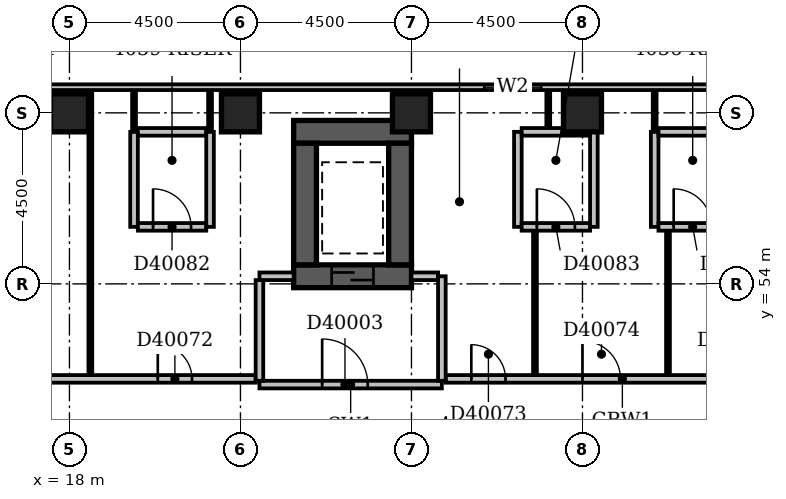
"""IFC4 building model, lengths in metres.
Left out: names, types, materials, properties, quantities, classifications, styles, units other than length and angle.
Written with IfcOpenShell. Run it as: python <this file> out.ifc"""

import sys

from ifc_helpers import new_model, si_unit, direction, frame, frame_2d, origin, origin_2d, place, context, subcontext, project, spatial, rectangle, extrude, element, fill, save


model = new_model("IFC4")
c1 = context("Model", 3, precision=1e-05, world=origin(), true_north=direction((0.0, 1.0)))
c2 = subcontext(c1, "Body", "Model", "MODEL_VIEW")
j1 = project(units=[si_unit("LENGTHUNIT", "METRE"), si_unit("PLANEANGLEUNIT", "RADIAN")], contexts=[c1])
p1 = place(None, origin())
s1 = spatial("IfcSite", under=j1, at=p1, CompositionType="ELEMENT")
p2 = place(p1, origin())
s2 = spatial("IfcBuilding", under=s1, at=p2, CompositionType="ELEMENT")
p3 = place(p2, frame((0.0, 0.0, 159.2)))
s3 = spatial("IfcBuildingStorey", under=s2, at=p3, CompositionType="ELEMENT", Elevation=159.2)
p4 = place(p3, frame((23.9, 54.2, -0.3), z_axis=(0.0, 0.0, 1.0), x_axis=(1.0, 0.0, 0.0)))
e1 = element("IfcWall", 1, at=p4, inside=s3, PredefinedType="SHEAR", context=c2, shape_type="SweptSolid", body=[
    extrude(rectangle(XDim=3.1, YDim=0.6, at=frame_2d((1.55, 0.0))), origin(), (0.0, 0.0, 1.0), 3.6),
])
p5 = place(p4, frame((1.0, 0.0, 0.3)))
e2 = element("IfcOpeningElement", 2, at=p5, cuts=e1, PredefinedType="OPENING", context=c2, shape_type="SweptSolid", body=[
    extrude(rectangle(XDim=1.1, YDim=2.1, at=frame_2d((0.55, 1.05))), frame((0.0, 0.312, 0.0), z_axis=(0.0, -1.0, 0.0), x_axis=(1.0, 0.0, 0.0)), (0.0, 0.0, 1.0), 0.624),
])
p6 = place(p3, frame((23.9, 58.0, -0.3), z_axis=(0.0, 0.0, 1.0), x_axis=(1.0, 0.0, 0.0)))
e3 = element("IfcWall", 3, at=p6, inside=s3, PredefinedType="SHEAR", context=c2, shape_type="SweptSolid", body=[
    extrude(rectangle(XDim=3.1, YDim=0.6, at=frame_2d((1.55, 0.0))), origin(), (0.0, 0.0, 1.0), 3.6),
])
for number, where, z_axis, x_axis in (
    (4, (24.2, 54.5, -0.3), (0.0, 0.0, 1.0), (0.0, 1.0, 0.0)),
    (5, (26.7, 54.5, -0.3), (0.0, 0.0, 1.0), (0.0, 1.0, 0.0)),
):
    element("IfcWall", number, at=place(p3, frame(where, z_axis=z_axis, x_axis=x_axis)), inside=s3, PredefinedType="SHEAR", context=c2, shape_type="SweptSolid", body=[
        extrude(rectangle(XDim=3.2, YDim=0.6, at=frame_2d((1.6, 0.0))), origin(), (0.0, 0.0, 1.0), 3.6),
    ])
for number, where, z_axis, x_axis in (
    (6, (18.0, 58.5, -0.3), (0.0, 0.0, 1.0), (1.0, 0.0, 0.0)),
    (7, (22.5, 58.5, -0.3), (0.0, 0.0, 1.0), (1.0, 0.0, 0.0)),
    (8, (27.0, 58.5, -0.3), (0.0, 0.0, 1.0), (1.0, 0.0, 0.0)),
    (9, (31.5, 58.5, -0.3), (0.0, 0.0, 1.0), (1.0, 0.0, 0.0)),
):
    element("IfcColumn", number, at=place(p3, frame(where, z_axis=z_axis, x_axis=x_axis)), inside=s3, PredefinedType="COLUMN", context=c2, shape_type="SweptSolid", body=[
        extrude(rectangle(XDim=1.0, YDim=1.0, at=origin_2d()), origin(), (0.0, 0.0, 1.0), 3.6),
    ])
p7 = place(p3, frame((68.1, 59.175, 0.0), z_axis=(0.0, 0.0, 1.0), x_axis=(-1.0, 0.0, 0.0)))
e10 = element("IfcWall", 10, at=p7, inside=s3, PredefinedType="STANDARD", context=c2, shape_type="SweptSolid", body=[
    extrude(rectangle(XDim=68.85, YDim=0.15, at=frame_2d((34.425, 0.0))), origin(), (0.0, 0.0, 1.0), 2.7),
])
p8 = place(p7, frame((1.65, 0.0, 0.6)))
e11 = element("IfcOpeningElement", 11, at=p8, cuts=e10, PredefinedType="OPENING", context=c2, shape_type="SweptSolid", body=[
    extrude(rectangle(XDim=2.4, YDim=1.8, at=frame_2d((1.2, 0.9))), frame((0.0, 0.087, 0.0), z_axis=(0.0, -1.0, 0.0), x_axis=(1.0, 0.0, 0.0)), (0.0, 0.0, 1.0), 0.174),
])
p9 = place(p7, frame((6.15, 0.0, 0.6)))
e12 = element("IfcOpeningElement", 12, at=p9, cuts=e10, PredefinedType="OPENING", context=c2, shape_type="SweptSolid", body=[
    extrude(rectangle(XDim=2.4, YDim=1.8, at=frame_2d((1.2, 0.9))), frame((0.0, 0.087, 0.0), z_axis=(0.0, -1.0, 0.0), x_axis=(1.0, 0.0, 0.0)), (0.0, 0.0, 1.0), 0.174),
])
p10 = place(p7, frame((37.685, 0.0, 0.6)))
e13 = element("IfcOpeningElement", 13, at=p10, cuts=e10, PredefinedType="OPENING", context=c2, shape_type="SweptSolid", body=[
    extrude(rectangle(XDim=1.5, YDim=1.8, at=frame_2d((0.75, 0.9))), frame((0.0, 0.087, 0.0), z_axis=(0.0, -1.0, 0.0), x_axis=(1.0, 0.0, 0.0)), (0.0, 0.0, 1.0), 0.174),
])
p11 = place(p3, frame((23.0, 51.35, 0.0), z_axis=(0.0, 0.0, 1.0), x_axis=(1.0, 0.0, 0.0)))
e14 = element("IfcWall", 14, at=p11, inside=s3, PredefinedType="PARTITIONING", context=c2, shape_type="SweptSolid", body=[
    extrude(rectangle(XDim=4.8, YDim=0.2, at=frame_2d((2.4, 0.0))), origin(), (0.0, 0.0, 1.0), 3.3),
])
p12 = place(p11, frame((1.65, 0.0, 0.0)))
e15 = element("IfcOpeningElement", 15, at=p12, cuts=e14, PredefinedType="OPENING", context=c2, shape_type="SweptSolid", body=[
    extrude(rectangle(XDim=1.2, YDim=2.1, at=frame_2d((0.6, 1.05))), frame((0.0, 0.112, 0.0), z_axis=(0.0, -1.0, 0.0), x_axis=(1.0, 0.0, 0.0)), (0.0, 0.0, 1.0), 0.224),
])
p13 = place(p3, frame((27.8, 51.45, 0.0), z_axis=(0.0, 0.0, 1.0), x_axis=(0.0, 1.0, 0.0)))
e16 = element("IfcWall", 16, at=p13, inside=s3, PredefinedType="PARTITIONING", context=c2, shape_type="SweptSolid", body=[
    extrude(rectangle(XDim=2.75, YDim=0.2, at=frame_2d((1.375, 0.0))), origin(), (0.0, 0.0, 1.0), 3.3),
])
p14 = place(p3, frame((23.0, 54.2, 0.0), z_axis=(0.0, 0.0, 1.0), x_axis=(1.0, 0.0, 0.0)))
e17 = element("IfcWall", 17, at=p14, inside=s3, PredefinedType="PARTITIONING", context=c2, shape_type="SweptSolid", body=[
    extrude(rectangle(XDim=0.9, YDim=0.2, at=frame_2d((0.45, 0.0))), origin(), (0.0, 0.0, 1.0), 3.3),
])
p15 = place(p3, frame((27.0, 54.2, 0.0), z_axis=(0.0, 0.0, 1.0), x_axis=(1.0, 0.0, 0.0)))
e18 = element("IfcWall", 18, at=p15, inside=s3, PredefinedType="PARTITIONING", context=c2, shape_type="SweptSolid", body=[
    extrude(rectangle(XDim=0.7, YDim=0.2, at=frame_2d((0.35, 0.0))), origin(), (0.0, 0.0, 1.0), 3.3),
])
p16 = place(p3, frame((23.0, 51.45, 0.0), z_axis=(0.0, 0.0, 1.0), x_axis=(0.0, 1.0, 0.0)))
e19 = element("IfcWall", 19, at=p16, inside=s3, PredefinedType="PARTITIONING", context=c2, shape_type="SweptSolid", body=[
    extrude(rectangle(XDim=2.65, YDim=0.2, at=frame_2d((1.325, 0.0))), origin(), (0.0, 0.0, 1.0), 3.3),
])
p17 = place(p3, frame((7.6, 51.5, 0.0), z_axis=(0.0, 0.0, 1.0), x_axis=(1.0, 0.0, 0.0)))
e20 = element("IfcWall", 20, at=p17, inside=s3, PredefinedType="PARTITIONING", context=c2, shape_type="SweptSolid", body=[
    extrude(rectangle(XDim=15.3, YDim=0.2, at=frame_2d((7.65, 0.0))), origin(), (0.0, 0.0, 1.0), 3.3),
])
p18 = place(p17, frame((2.075, 0.0, 0.0)))
e21 = element("IfcOpeningElement", 21, at=p18, cuts=e20, PredefinedType="OPENING", context=c2, shape_type="SweptSolid", body=[
    extrude(rectangle(XDim=1.0, YDim=2.1, at=frame_2d((0.5, 1.05))), frame((0.0, 0.112, 0.0), z_axis=(0.0, -1.0, 0.0), x_axis=(1.0, 0.0, 0.0)), (0.0, 0.0, 1.0), 0.224),
])
p19 = place(p17, frame((7.6, 0.0, 0.0)))
e22 = element("IfcOpeningElement", 22, at=p19, cuts=e20, PredefinedType="OPENING", context=c2, shape_type="SweptSolid", body=[
    extrude(rectangle(XDim=1.0, YDim=2.1, at=frame_2d((0.5, 1.05))), frame((0.0, 0.112, 0.0), z_axis=(0.0, -1.0, 0.0), x_axis=(1.0, 0.0, 0.0)), (0.0, 0.0, 1.0), 0.224),
])
p20 = place(p17, frame((12.725, 0.0, 0.0)))
e23 = element("IfcOpeningElement", 23, at=p20, cuts=e20, PredefinedType="OPENING", context=c2, shape_type="SweptSolid", body=[
    extrude(rectangle(XDim=0.9, YDim=2.1, at=frame_2d((0.45, 1.05))), frame((0.0, 0.112, 0.0), z_axis=(0.0, -1.0, 0.0), x_axis=(1.0, 0.0, 0.0)), (0.0, 0.0, 1.0), 0.224),
])
p21 = place(p3, frame((27.9, 51.5, 0.0), z_axis=(0.0, 0.0, 1.0), x_axis=(1.0, 0.0, 0.0)))
e24 = element("IfcWall", 24, at=p21, inside=s3, PredefinedType="PARTITIONING", context=c2, shape_type="SweptSolid", body=[
    extrude(rectangle(XDim=9.3, YDim=0.2, at=frame_2d((4.65, 0.0))), origin(), (0.0, 0.0, 1.0), 3.3),
])
p22 = place(p21, frame((0.675, 0.0, 0.0)))
e25 = element("IfcOpeningElement", 25, at=p22, cuts=e24, PredefinedType="OPENING", context=c2, shape_type="SweptSolid", body=[
    extrude(rectangle(XDim=0.9, YDim=2.1, at=frame_2d((0.45, 1.05))), frame((0.0, 0.112, 0.0), z_axis=(0.0, -1.0, 0.0), x_axis=(1.0, 0.0, 0.0)), (0.0, 0.0, 1.0), 0.224),
])
p23 = place(p21, frame((3.6, 0.0, 0.0)))
e26 = element("IfcOpeningElement", 26, at=p23, cuts=e24, PredefinedType="OPENING", context=c2, shape_type="SweptSolid", body=[
    extrude(rectangle(XDim=1.0, YDim=2.1, at=frame_2d((0.5, 1.05))), frame((0.0, 0.112, 0.0), z_axis=(0.0, -1.0, 0.0), x_axis=(1.0, 0.0, 0.0)), (0.0, 0.0, 1.0), 0.224),
])
p24 = place(p21, frame((7.125, 0.0, 0.0)))
e27 = element("IfcOpeningElement", 27, at=p24, cuts=e24, PredefinedType="OPENING", context=c2, shape_type="SweptSolid", body=[
    extrude(rectangle(XDim=1.0, YDim=2.1, at=frame_2d((0.5, 1.05))), frame((0.0, 0.112, 0.0), z_axis=(0.0, -1.0, 0.0), x_axis=(1.0, 0.0, 0.0)), (0.0, 0.0, 1.0), 0.224),
])
p25 = place(p3, frame((18.55, 51.6, 0.0), z_axis=(0.0, 0.0, 1.0), x_axis=(0.0, 1.0, 0.0)))
e28 = element("IfcWall", 28, at=p25, inside=s3, PredefinedType="PARTITIONING", context=c2, shape_type="SweptSolid", body=[
    extrude(rectangle(XDim=7.5, YDim=0.1, at=frame_2d((3.75, 0.0))), origin(), (0.0, 0.0, 1.0), 3.3),
])
for number, where, z_axis, x_axis in (
    (29, (30.25, 51.6, 0.0), (0.0, 0.0, 1.0), (0.0, 1.0, 0.0)),
    (30, (33.75, 51.6, 0.0), (0.0, 0.0, 1.0), (0.0, 1.0, 0.0)),
):
    element("IfcWall", number, at=place(p3, frame(where, z_axis=z_axis, x_axis=x_axis)), inside=s3, PredefinedType="PARTITIONING", context=c2, shape_type="SweptSolid", body=[
        extrude(rectangle(XDim=3.8, YDim=0.1, at=frame_2d((1.9, 0.0))), origin(), (0.0, 0.0, 1.0), 3.3),
    ])
p26 = place(p3, frame((19.7, 55.5, 0.0), z_axis=(0.0, 0.0, 1.0), x_axis=(0.0, 1.0, 0.0)))
e31 = element("IfcWall", 31, at=p26, inside=s3, PredefinedType="PARTITIONING", context=c2, shape_type="SweptSolid", body=[
    extrude(rectangle(XDim=2.5, YDim=0.2, at=frame_2d((1.25, 0.0))), origin(), (0.0, 0.0, 1.0), 3.3),
])
p27 = place(p3, frame((19.8, 55.5, 0.0), z_axis=(0.0, 0.0, 1.0), x_axis=(1.0, 0.0, 0.0)))
e32 = element("IfcWall", 32, at=p27, inside=s3, PredefinedType="PARTITIONING", context=c2, shape_type="SweptSolid", body=[
    extrude(rectangle(XDim=1.8, YDim=0.2, at=frame_2d((0.9, 0.0))), origin(), (0.0, 0.0, 1.0), 3.3),
])
p28 = place(p27, frame((0.4, 0.0, 0.0)))
e33 = element("IfcOpeningElement", 33, at=p28, cuts=e32, PredefinedType="OPENING", context=c2, shape_type="SweptSolid", body=[
    extrude(rectangle(XDim=1.0, YDim=2.1, at=frame_2d((0.5, 1.05))), frame((0.0, 0.112, 0.0), z_axis=(0.0, -1.0, 0.0), x_axis=(1.0, 0.0, 0.0)), (0.0, 0.0, 1.0), 0.224),
])
for number, where, z_axis, x_axis in (
    (34, (21.7, 55.5, 0.0), (0.0, 0.0, 1.0), (0.0, 1.0, 0.0)),
    (35, (29.8, 55.5, 0.0), (0.0, 0.0, 1.0), (0.0, 1.0, 0.0)),
):
    element("IfcWall", number, at=place(p3, frame(where, z_axis=z_axis, x_axis=x_axis)), inside=s3, PredefinedType="PARTITIONING", context=c2, shape_type="SweptSolid", body=[
        extrude(rectangle(XDim=2.5, YDim=0.2, at=frame_2d((1.25, 0.0))), origin(), (0.0, 0.0, 1.0), 3.3),
    ])
p29 = place(p3, frame((29.9, 55.5, 0.0), z_axis=(0.0, 0.0, 1.0), x_axis=(1.0, 0.0, 0.0)))
e36 = element("IfcWall", 36, at=p29, inside=s3, PredefinedType="PARTITIONING", context=c2, shape_type="SweptSolid", body=[
    extrude(rectangle(XDim=1.8, YDim=0.2, at=frame_2d((0.9, 0.0))), origin(), (0.0, 0.0, 1.0), 3.3),
])
p30 = place(p29, frame((0.4, 0.0, 0.0)))
e37 = element("IfcOpeningElement", 37, at=p30, cuts=e36, PredefinedType="OPENING", context=c2, shape_type="SweptSolid", body=[
    extrude(rectangle(XDim=1.0, YDim=2.1, at=frame_2d((0.5, 1.05))), frame((0.0, 0.112, 0.0), z_axis=(0.0, -1.0, 0.0), x_axis=(1.0, 0.0, 0.0)), (0.0, 0.0, 1.0), 0.224),
])
for number, where, z_axis, x_axis in (
    (38, (31.8, 55.5, 0.0), (0.0, 0.0, 1.0), (0.0, 1.0, 0.0)),
    (39, (33.4, 55.5, 0.0), (0.0, 0.0, 1.0), (0.0, 1.0, 0.0)),
):
    element("IfcWall", number, at=place(p3, frame(where, z_axis=z_axis, x_axis=x_axis)), inside=s3, PredefinedType="PARTITIONING", context=c2, shape_type="SweptSolid", body=[
        extrude(rectangle(XDim=2.5, YDim=0.2, at=frame_2d((1.25, 0.0))), origin(), (0.0, 0.0, 1.0), 3.3),
    ])
p31 = place(p3, frame((33.5, 55.5, 0.0), z_axis=(0.0, 0.0, 1.0), x_axis=(1.0, 0.0, 0.0)))
e40 = element("IfcWall", 40, at=p31, inside=s3, PredefinedType="PARTITIONING", context=c2, shape_type="SweptSolid", body=[
    extrude(rectangle(XDim=1.8, YDim=0.2, at=frame_2d((0.9, 0.0))), origin(), (0.0, 0.0, 1.0), 3.3),
])
p32 = place(p31, frame((0.4, 0.0, 0.0)))
e41 = element("IfcOpeningElement", 41, at=p32, cuts=e40, PredefinedType="OPENING", context=c2, shape_type="SweptSolid", body=[
    extrude(rectangle(XDim=1.0, YDim=2.1, at=frame_2d((0.5, 1.05))), frame((0.0, 0.112, 0.0), z_axis=(0.0, -1.0, 0.0), x_axis=(1.0, 0.0, 0.0)), (0.0, 0.0, 1.0), 0.224),
])
p33 = place(p3, frame((19.7, 58.0, 0.0), z_axis=(0.0, 0.0, 1.0), x_axis=(0.0, 1.0, 0.0)))
e42 = element("IfcWall", 42, at=p33, inside=s3, PredefinedType="PARTITIONING", context=c2, shape_type="SweptSolid", body=[
    extrude(rectangle(XDim=1.1, YDim=0.1, at=frame_2d((0.55, 0.0))), origin(), (0.0, 0.0, 1.0), 3.3),
])
p34 = place(p3, frame((19.8, 58.0, 0.0), z_axis=(0.0, 0.0, 1.0), x_axis=(1.0, 0.0, 0.0)))
e43 = element("IfcWall", 43, at=p34, inside=s3, PredefinedType="PARTITIONING", context=c2, shape_type="SweptSolid", body=[
    extrude(rectangle(XDim=1.8, YDim=0.2, at=frame_2d((0.9, 0.0))), origin(), (0.0, 0.0, 1.0), 3.3),
])
p35 = place(p3, frame((21.7, 58.0, 0.0), z_axis=(0.0, 0.0, 1.0), x_axis=(0.0, 1.0, 0.0)))
e44 = element("IfcWall", 44, at=p35, inside=s3, PredefinedType="PARTITIONING", context=c2, shape_type="SweptSolid", body=[
    extrude(rectangle(XDim=1.1, YDim=0.1, at=frame_2d((0.55, 0.0))), origin(), (0.0, 0.0, 1.0), 3.3),
])
p36 = place(p3, frame((29.9, 58.0, 0.0), z_axis=(0.0, 0.0, 1.0), x_axis=(1.0, 0.0, 0.0)))
e45 = element("IfcWall", 45, at=p36, inside=s3, PredefinedType="PARTITIONING", context=c2, shape_type="SweptSolid", body=[
    extrude(rectangle(XDim=1.8, YDim=0.2, at=frame_2d((0.9, 0.0))), origin(), (0.0, 0.0, 1.0), 3.3),
])
p37 = place(p3, frame((33.4, 58.0, 0.0), z_axis=(0.0, 0.0, 1.0), x_axis=(0.0, 1.0, 0.0)))
e46 = element("IfcWall", 46, at=p37, inside=s3, PredefinedType="PARTITIONING", context=c2, shape_type="SweptSolid", body=[
    extrude(rectangle(XDim=1.1, YDim=0.1, at=frame_2d((0.55, 0.0))), origin(), (0.0, 0.0, 1.0), 3.3),
])
p38 = place(p3, frame((33.5, 58.0, 0.0), z_axis=(0.0, 0.0, 1.0), x_axis=(1.0, 0.0, 0.0)))
e47 = element("IfcWall", 47, at=p38, inside=s3, PredefinedType="PARTITIONING", context=c2, shape_type="SweptSolid", body=[
    extrude(rectangle(XDim=1.8, YDim=0.2, at=frame_2d((0.9, 0.0))), origin(), (0.0, 0.0, 1.0), 3.3),
])
p39 = place(p3, frame((30.6, 58.1, 0.0), z_axis=(0.0, 0.0, 1.0), x_axis=(0.0, 1.0, 0.0)))
e48 = element("IfcWall", 48, at=p39, inside=s3, PredefinedType="PARTITIONING", context=c2, shape_type="SweptSolid", body=[
    extrude(rectangle(XDim=1.0, YDim=0.1, at=frame_2d((0.5, 0.0))), origin(), (0.0, 0.0, 1.0), 3.3),
])
p40 = place(p10, origin())
e49 = element("IfcWindow", 49, at=p40, inside=s3, PartitioningType="SINGLE_PANEL", PredefinedType="WINDOW", context=c2, shape_type="SweptSolid", body=[
    extrude(rectangle(XDim=1.5, YDim=1.8, at=frame_2d((0.75, 0.9))), frame((0.0, 0.03, 0.0), z_axis=(0.0, -1.0, 0.0), x_axis=(1.0, 0.0, 0.0)), (0.0, 0.0, 1.0), 0.06),
])
fill(e13, e49)
p41 = place(p12, origin())
e50 = element("IfcDoor", 50, at=p41, inside=s3, OperationType="SINGLE_SWING_LEFT", PredefinedType="DOOR", context=c2, shape_type="SweptSolid", body=[
    extrude(rectangle(XDim=1.2, YDim=2.1, at=frame_2d((0.6, 1.05))), frame((0.0, 0.025, 0.0), z_axis=(0.0, -1.0, 0.0), x_axis=(1.0, 0.0, 0.0)), (0.0, 0.0, 1.0), 0.05),
])
fill(e15, e50)
p42 = place(p5, origin())
e51 = element("IfcDoor", 51, at=p42, inside=s3, OperationType="SLIDING_TO_LEFT", PredefinedType="DOOR", context=c2, shape_type="SweptSolid", body=[
    extrude(rectangle(XDim=1.1, YDim=2.1, at=frame_2d((0.55, 1.05))), frame((0.0, 0.025, 0.0), z_axis=(0.0, -1.0, 0.0), x_axis=(1.0, 0.0, 0.0)), (0.0, 0.0, 1.0), 0.05),
])
fill(e2, e51)
p43 = place(p20, origin())
e52 = element("IfcDoor", 52, at=p43, inside=s3, OperationType="SINGLE_SWING_LEFT", PredefinedType="DOOR", context=c2, shape_type="SweptSolid", body=[
    extrude(rectangle(XDim=0.9, YDim=2.1, at=frame_2d((0.45, 1.05))), frame((0.0, 0.025, 0.0), z_axis=(0.0, -1.0, 0.0), x_axis=(1.0, 0.0, 0.0)), (0.0, 0.0, 1.0), 0.05),
])
fill(e23, e52)
p44 = place(p22, origin())
e53 = element("IfcDoor", 53, at=p44, inside=s3, OperationType="SINGLE_SWING_LEFT", PredefinedType="DOOR", context=c2, shape_type="SweptSolid", body=[
    extrude(rectangle(XDim=0.9, YDim=2.1, at=frame_2d((0.45, 1.05))), frame((0.0, 0.025, 0.0), z_axis=(0.0, -1.0, 0.0), x_axis=(1.0, 0.0, 0.0)), (0.0, 0.0, 1.0), 0.05),
])
fill(e25, e53)
p45 = place(p23, origin())
e54 = element("IfcDoor", 54, at=p45, inside=s3, OperationType="SINGLE_SWING_LEFT", PredefinedType="DOOR", context=c2, shape_type="SweptSolid", body=[
    extrude(rectangle(XDim=1.0, YDim=2.1, at=frame_2d((0.5, 1.05))), frame((0.0, 0.025, 0.0), z_axis=(0.0, -1.0, 0.0), x_axis=(1.0, 0.0, 0.0)), (0.0, 0.0, 1.0), 0.05),
])
fill(e26, e54)
p46 = place(p28, origin())
e55 = element("IfcDoor", 55, at=p46, inside=s3, OperationType="SINGLE_SWING_LEFT", PredefinedType="DOOR", context=c2, shape_type="SweptSolid", body=[
    extrude(rectangle(XDim=1.0, YDim=2.1, at=frame_2d((0.5, 1.05))), frame((0.0, 0.025, 0.0), z_axis=(0.0, -1.0, 0.0), x_axis=(1.0, 0.0, 0.0)), (0.0, 0.0, 1.0), 0.05),
])
fill(e33, e55)
p47 = place(p30, origin())
e56 = element("IfcDoor", 56, at=p47, inside=s3, OperationType="SINGLE_SWING_LEFT", PredefinedType="DOOR", context=c2, shape_type="SweptSolid", body=[
    extrude(rectangle(XDim=1.0, YDim=2.1, at=frame_2d((0.5, 1.05))), frame((0.0, 0.025, 0.0), z_axis=(0.0, -1.0, 0.0), x_axis=(1.0, 0.0, 0.0)), (0.0, 0.0, 1.0), 0.05),
])
fill(e37, e56)
p48 = place(p32, origin())
e57 = element("IfcDoor", 57, at=p48, inside=s3, OperationType="SINGLE_SWING_LEFT", PredefinedType="DOOR", context=c2, shape_type="SweptSolid", body=[
    extrude(rectangle(XDim=1.0, YDim=2.1, at=frame_2d((0.5, 1.05))), frame((0.0, 0.025, 0.0), z_axis=(0.0, -1.0, 0.0), x_axis=(1.0, 0.0, 0.0)), (0.0, 0.0, 1.0), 0.05),
])
fill(e41, e57)
save(model, sys.argv[1])
